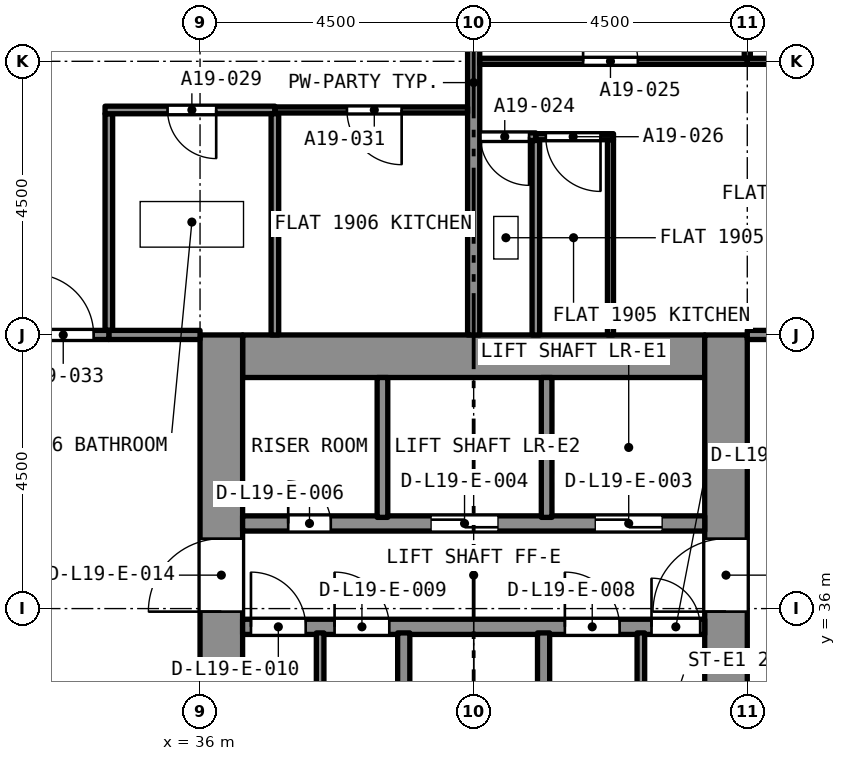
"""IFC4 building model, lengths in metres.
Left out: names, types, materials, properties, quantities, classifications, styles, units other than length and angle.
Written with IfcOpenShell. Run it as: python <this file> out.ifc"""

import sys

from ifc_helpers import new_model, si_unit, direction, frame, frame_2d, origin, place, context, subcontext, project, spatial, rectangle, extrude, element, fill, save


model = new_model("IFC4")
c1 = context("Model", 3, precision=1e-05, world=origin(), true_north=direction((0.0, 1.0)))
c2 = subcontext(c1, "Body", "Model", "MODEL_VIEW")
j1 = project(units=[si_unit("LENGTHUNIT", "METRE"), si_unit("PLANEANGLEUNIT", "RADIAN")], contexts=[c1])
p1 = place(None, origin())
s1 = spatial("IfcSite", under=j1, at=p1, CompositionType="ELEMENT")
p2 = place(p1, origin())
s2 = spatial("IfcBuilding", under=s1, at=p2, CompositionType="ELEMENT")
p3 = place(p2, frame((0.0, 0.0, 72.0)))
s3 = spatial("IfcBuildingStorey", under=s2, at=p3, CompositionType="ELEMENT", Elevation=72.0)
p4 = place(p3, frame((36.7, 40.15, 0.0), z_axis=(0.0, 0.0, 1.0), x_axis=(1.0, 0.0, 0.0)))
e1 = element("IfcWall", 1, at=p4, inside=s3, PredefinedType="SOLIDWALL", context=c2, shape_type="SweptSolid", body=[
    extrude(rectangle(XDim=7.6, YDim=0.7, at=frame_2d((3.8, 0.0))), origin(), (0.0, 0.0, 1.0), 3.2),
])
p5 = place(p3, frame((36.35, 27.0, 0.0), z_axis=(0.0, 0.0, 1.0), x_axis=(0.0, 1.0, 0.0)))
e2 = element("IfcWall", 2, at=p5, inside=s3, PredefinedType="SOLIDWALL", context=c2, shape_type="SweptSolid", body=[
    extrude(rectangle(XDim=13.5, YDim=0.7, at=frame_2d((6.75, 0.0))), origin(), (0.0, 0.0, 1.0), 3.2),
])
p6 = place(p5, frame((8.95, 0.0, 0.0)))
e3 = element("IfcOpeningElement", 3, at=p6, cuts=e2, PredefinedType="OPENING", context=c2, shape_type="SweptSolid", body=[
    extrude(rectangle(XDim=1.2, YDim=2.1, at=frame_2d((0.6, 1.05))), frame((0.0, 0.36, 0.0), z_axis=(0.0, -1.0, 0.0), x_axis=(1.0, 0.0, 0.0)), (0.0, 0.0, 1.0), 0.72),
])
p7 = place(p3, frame((44.65, 27.0, 0.0), z_axis=(0.0, 0.0, 1.0), x_axis=(0.0, 1.0, 0.0)))
e4 = element("IfcWall", 4, at=p7, inside=s3, PredefinedType="SOLIDWALL", context=c2, shape_type="SweptSolid", body=[
    extrude(rectangle(XDim=13.5, YDim=0.7, at=frame_2d((6.75, 0.0))), origin(), (0.0, 0.0, 1.0), 3.2),
])
p8 = place(p7, frame((8.95, 0.0, 0.0)))
e5 = element("IfcOpeningElement", 5, at=p8, cuts=e4, PredefinedType="OPENING", context=c2, shape_type="SweptSolid", body=[
    extrude(rectangle(XDim=1.2, YDim=2.1, at=frame_2d((0.6, 1.05))), frame((0.0, 0.36, 0.0), z_axis=(0.0, -1.0, 0.0), x_axis=(1.0, 0.0, 0.0)), (0.0, 0.0, 1.0), 0.72),
])
p9 = place(p3, frame((41.523, 43.76, 0.0), z_axis=(0.0, 0.0, 1.0), x_axis=(-1.0, 0.0, 0.0)))
e6 = element("IfcWall", 6, at=p9, inside=s3, PredefinedType="PARTITIONING", context=c2, shape_type="SweptSolid", body=[
    extrude(rectangle(XDim=0.923, YDim=0.125, at=frame_2d((0.461, 0.0))), origin(), (0.0, 0.0, 1.0), 2.7),
])
p10 = place(p9, frame((0.111, 0.0, 0.0)))
e7 = element("IfcOpeningElement", 7, at=p10, cuts=e6, PredefinedType="OPENING", context=c2, shape_type="SweptSolid", body=[
    extrude(rectangle(XDim=0.8, YDim=2.1, at=frame_2d((0.4, 1.05))), frame((0.0, 0.073, 0.0), z_axis=(0.0, -1.0, 0.0), x_axis=(1.0, 0.0, 0.0)), (0.0, 0.0, 1.0), 0.145),
])
p11 = place(p3, frame((41.523, 40.5, 0.0), z_axis=(0.0, 0.0, 1.0), x_axis=(0.0, 1.0, 0.0)))
e8 = element("IfcWall", 8, at=p11, inside=s3, PredefinedType="PARTITIONING", context=c2, shape_type="SweptSolid", body=[
    extrude(rectangle(XDim=3.198, YDim=0.125, at=frame_2d((1.599, 0.0))), origin(), (0.0, 0.0, 1.0), 2.7),
])
p12 = place(p3, frame((40.5, 40.5, 0.0), z_axis=(0.0, 0.0, 1.0), x_axis=(0.0, 1.0, 0.0)))
e9 = element("IfcWall", 9, at=p12, inside=s3, PredefinedType="PARTITIONING", context=c2, shape_type="SweptSolid", body=[
    extrude(rectangle(XDim=8.3, YDim=0.2, at=frame_2d((4.15, 0.0))), origin(), (0.0, 0.0, 1.0), 2.7),
])
p13 = place(p3, frame((40.6, 45.0, 0.0), z_axis=(0.0, 0.0, 1.0), x_axis=(1.0, 0.0, 0.0)))
e10 = element("IfcWall", 10, at=p13, inside=s3, PredefinedType="PARTITIONING", context=c2, shape_type="SweptSolid", body=[
    extrude(rectangle(XDim=4.4, YDim=0.1, at=frame_2d((2.2, 0.0))), origin(), (0.0, 0.0, 1.0), 2.7),
])
p14 = place(p13, frame((1.7, 0.0, 0.0)))
e11 = element("IfcOpeningElement", 11, at=p14, cuts=e10, PredefinedType="OPENING", context=c2, shape_type="SweptSolid", body=[
    extrude(rectangle(XDim=0.9, YDim=2.1, at=frame_2d((0.45, 1.05))), frame((0.0, 0.06, 0.0), z_axis=(0.0, -1.0, 0.0), x_axis=(1.0, 0.0, 0.0)), (0.0, 0.0, 1.0), 0.12),
])
p15 = place(p3, frame((45.0, 45.05, 0.0), z_axis=(0.0, 0.0, 1.0), x_axis=(0.0, 1.0, 0.0)))
e12 = element("IfcWall", 12, at=p15, inside=s3, PredefinedType="PARTITIONING", context=c2, shape_type="SweptSolid", body=[
    extrude(rectangle(XDim=3.692, YDim=0.1, at=frame_2d((1.846, 0.0))), origin(), (0.0, 0.0, 1.0), 2.7),
])
p16 = place(p3, frame((42.75, 40.5, 0.0), z_axis=(0.0, 0.0, 1.0), x_axis=(0.0, 1.0, 0.0)))
e13 = element("IfcWall", 13, at=p16, inside=s3, PredefinedType="PARTITIONING", context=c2, shape_type="SweptSolid", body=[
    extrude(rectangle(XDim=3.21, YDim=0.1, at=frame_2d((1.605, 0.0))), origin(), (0.0, 0.0, 1.0), 2.7),
])
p17 = place(p3, frame((42.8, 43.76, 0.0), z_axis=(0.0, 0.0, 1.0), x_axis=(-1.0, 0.0, 0.0)))
e14 = element("IfcWall", 14, at=p17, inside=s3, PredefinedType="PARTITIONING", context=c2, shape_type="SweptSolid", body=[
    extrude(rectangle(XDim=1.277, YDim=0.1, at=frame_2d((0.639, 0.0))), origin(), (0.0, 0.0, 1.0), 2.7),
])
p18 = place(p17, frame((0.214, 0.0, 0.0)))
e15 = element("IfcOpeningElement", 15, at=p18, cuts=e14, PredefinedType="OPENING", context=c2, shape_type="SweptSolid", body=[
    extrude(rectangle(XDim=0.9, YDim=2.1, at=frame_2d((0.45, 1.05))), frame((0.0, 0.06, 0.0), z_axis=(0.0, -1.0, 0.0), x_axis=(1.0, 0.0, 0.0)), (0.0, 0.0, 1.0), 0.12),
])
p19 = place(p3, frame((45.0, 45.0, 0.0), z_axis=(0.0, 0.0, 1.0), x_axis=(1.0, 0.0, 0.0)))
e16 = element("IfcWall", 16, at=p19, inside=s3, PredefinedType="PARTITIONING", context=c2, shape_type="SweptSolid", body=[
    extrude(rectangle(XDim=3.742, YDim=0.1, at=frame_2d((1.871, 0.0))), origin(), (0.0, 0.0, 1.0), 2.7),
])
p20 = place(p19, frame((1.4, 0.0, 0.0)))
e17 = element("IfcOpeningElement", 17, at=p20, cuts=e16, PredefinedType="OPENING", context=c2, shape_type="SweptSolid", body=[
    extrude(rectangle(XDim=1.0, YDim=2.1, at=frame_2d((0.5, 1.05))), frame((0.0, 0.06, 0.0), z_axis=(0.0, -1.0, 0.0), x_axis=(1.0, 0.0, 0.0)), (0.0, 0.0, 1.0), 0.12),
])
p21 = place(p3, frame((45.0, 40.5, 0.0), z_axis=(0.0, 0.0, 1.0), x_axis=(1.0, 0.0, 0.0)))
e18 = element("IfcWall", 18, at=p21, inside=s3, PredefinedType="PARTITIONING", context=c2, shape_type="SweptSolid", body=[
    extrude(rectangle(XDim=3.8, YDim=0.15, at=frame_2d((1.9, 0.0))), origin(), (0.0, 0.0, 1.0), 2.7),
])
p22 = place(p21, frame((1.75, 0.0, 0.0)))
e19 = element("IfcOpeningElement", 19, at=p22, cuts=e18, PredefinedType="OPENING", context=c2, shape_type="SweptSolid", body=[
    extrude(rectangle(XDim=1.0, YDim=2.1, at=frame_2d((0.5, 1.05))), frame((0.0, 0.085, 0.0), z_axis=(0.0, -1.0, 0.0), x_axis=(1.0, 0.0, 0.0)), (0.0, 0.0, 1.0), 0.17),
])
p23 = place(p3, frame((34.5, 40.575, 0.0), z_axis=(0.0, 0.0, 1.0), x_axis=(0.0, 1.0, 0.0)))
e20 = element("IfcWall", 20, at=p23, inside=s3, PredefinedType="PARTITIONING", context=c2, shape_type="SweptSolid", body=[
    extrude(rectangle(XDim=3.562, YDim=0.125, at=frame_2d((1.781, 0.0))), origin(), (0.0, 0.0, 1.0), 2.7),
])
p24 = place(p3, frame((37.231, 44.2, 0.0), z_axis=(0.0, 0.0, 1.0), x_axis=(-1.0, 0.0, 0.0)))
e21 = element("IfcWall", 21, at=p24, inside=s3, PredefinedType="PARTITIONING", context=c2, shape_type="SweptSolid", body=[
    extrude(rectangle(XDim=2.794, YDim=0.125, at=frame_2d((1.397, 0.0))), origin(), (0.0, 0.0, 1.0), 2.7),
])
p25 = place(p24, frame((0.966, 0.0, 0.0)))
e22 = element("IfcOpeningElement", 22, at=p25, cuts=e21, PredefinedType="OPENING", context=c2, shape_type="SweptSolid", body=[
    extrude(rectangle(XDim=0.8, YDim=2.1, at=frame_2d((0.4, 1.05))), frame((0.0, 0.073, 0.0), z_axis=(0.0, -1.0, 0.0), x_axis=(1.0, 0.0, 0.0)), (0.0, 0.0, 1.0), 0.145),
])
p26 = place(p3, frame((37.231, 40.5, 0.0), z_axis=(0.0, 0.0, 1.0), x_axis=(0.0, 1.0, 0.0)))
e23 = element("IfcWall", 23, at=p26, inside=s3, PredefinedType="PARTITIONING", context=c2, shape_type="SweptSolid", body=[
    extrude(rectangle(XDim=3.637, YDim=0.125, at=frame_2d((1.819, 0.0))), origin(), (0.0, 0.0, 1.0), 2.7),
])
p27 = place(p3, frame((34.5, 40.5, 0.0), z_axis=(0.0, 0.0, 1.0), x_axis=(1.0, 0.0, 0.0)))
e24 = element("IfcWall", 24, at=p27, inside=s3, PredefinedType="PARTITIONING", context=c2, shape_type="SweptSolid", body=[
    extrude(rectangle(XDim=1.5, YDim=0.15, at=frame_2d((0.75, 0.0))), origin(), (0.0, 0.0, 1.0), 2.7),
])
p28 = place(p3, frame((40.4, 44.2, 0.0), z_axis=(0.0, 0.0, 1.0), x_axis=(-1.0, 0.0, 0.0)))
e25 = element("IfcWall", 25, at=p28, inside=s3, PredefinedType="PARTITIONING", context=c2, shape_type="SweptSolid", body=[
    extrude(rectangle(XDim=3.168, YDim=0.1, at=frame_2d((1.584, 0.0))), origin(), (0.0, 0.0, 1.0), 2.7),
])
p29 = place(p28, frame((1.084, 0.0, 0.0)))
e26 = element("IfcOpeningElement", 26, at=p29, cuts=e25, PredefinedType="OPENING", context=c2, shape_type="SweptSolid", body=[
    extrude(rectangle(XDim=0.9, YDim=2.1, at=frame_2d((0.45, 1.05))), frame((0.0, 0.06, 0.0), z_axis=(0.0, -1.0, 0.0), x_axis=(1.0, 0.0, 0.0)), (0.0, 0.0, 1.0), 0.12),
])
p30 = place(p3, frame((32.2, 40.5, 0.0), z_axis=(0.0, 0.0, 1.0), x_axis=(1.0, 0.0, 0.0)))
e27 = element("IfcWall", 27, at=p30, inside=s3, PredefinedType="PARTITIONING", context=c2, shape_type="SweptSolid", body=[
    extrude(rectangle(XDim=2.3, YDim=0.15, at=frame_2d((1.15, 0.0))), origin(), (0.0, 0.0, 1.0), 2.7),
])
p31 = place(p30, frame((1.05, 0.0, 0.0)))
e28 = element("IfcOpeningElement", 28, at=p31, cuts=e27, PredefinedType="OPENING", context=c2, shape_type="SweptSolid", body=[
    extrude(rectangle(XDim=1.0, YDim=2.1, at=frame_2d((0.5, 1.05))), frame((0.0, 0.085, 0.0), z_axis=(0.0, -1.0, 0.0), x_axis=(1.0, 0.0, 0.0)), (0.0, 0.0, 1.0), 0.17),
])
p32 = place(p3, frame((36.7, 35.7, 0.0), z_axis=(0.0, 0.0, 1.0), x_axis=(1.0, 0.0, 0.0)))
e29 = element("IfcWall", 29, at=p32, inside=s3, PredefinedType="SOLIDWALL", context=c2, shape_type="SweptSolid", body=[
    extrude(rectangle(XDim=7.6, YDim=0.25, at=frame_2d((3.8, 0.0))), origin(), (0.0, 0.0, 1.0), 2.7),
])
p33 = place(p32, frame((6.725, 0.0, 0.0)))
e30 = element("IfcOpeningElement", 30, at=p33, cuts=e29, PredefinedType="OPENING", context=c2, shape_type="SweptSolid", body=[
    extrude(rectangle(XDim=0.8, YDim=2.1, at=frame_2d((0.4, 1.05))), frame((0.0, 0.135, 0.0), z_axis=(0.0, -1.0, 0.0), x_axis=(1.0, 0.0, 0.0)), (0.0, 0.0, 1.0), 0.27),
])
p34 = place(p32, frame((5.3, 0.0, 0.0)))
e31 = element("IfcOpeningElement", 31, at=p34, cuts=e29, PredefinedType="OPENING", context=c2, shape_type="SweptSolid", body=[
    extrude(rectangle(XDim=0.9, YDim=2.1, at=frame_2d((0.45, 1.05))), frame((0.0, 0.135, 0.0), z_axis=(0.0, -1.0, 0.0), x_axis=(1.0, 0.0, 0.0)), (0.0, 0.0, 1.0), 0.27),
])
p35 = place(p32, frame((1.512, 0.0, 0.0)))
e32 = element("IfcOpeningElement", 32, at=p35, cuts=e29, PredefinedType="OPENING", context=c2, shape_type="SweptSolid", body=[
    extrude(rectangle(XDim=0.9, YDim=2.1, at=frame_2d((0.45, 1.05))), frame((0.0, 0.135, 0.0), z_axis=(0.0, -1.0, 0.0), x_axis=(1.0, 0.0, 0.0)), (0.0, 0.0, 1.0), 0.27),
])
p36 = place(p32, frame((0.137, 0.0, 0.0)))
e33 = element("IfcOpeningElement", 33, at=p36, cuts=e29, PredefinedType="OPENING", context=c2, shape_type="SweptSolid", body=[
    extrude(rectangle(XDim=0.9, YDim=2.1, at=frame_2d((0.45, 1.05))), frame((0.0, 0.135, 0.0), z_axis=(0.0, -1.0, 0.0), x_axis=(1.0, 0.0, 0.0)), (0.0, 0.0, 1.0), 0.27),
])
p37 = place(p3, frame((36.7, 37.4, 0.0), z_axis=(0.0, 0.0, 1.0), x_axis=(1.0, 0.0, 0.0)))
e34 = element("IfcWall", 34, at=p37, inside=s3, PredefinedType="SOLIDWALL", context=c2, shape_type="SweptSolid", body=[
    extrude(rectangle(XDim=7.6, YDim=0.25, at=frame_2d((3.8, 0.0))), origin(), (0.0, 0.0, 1.0), 2.7),
])
p38 = place(p37, frame((5.8, 0.0, 0.0)))
e35 = element("IfcOpeningElement", 35, at=p38, cuts=e34, PredefinedType="OPENING", context=c2, shape_type="SweptSolid", body=[
    extrude(rectangle(XDim=1.1, YDim=2.4, at=frame_2d((0.55, 1.2))), frame((0.0, 0.135, 0.0), z_axis=(0.0, -1.0, 0.0), x_axis=(1.0, 0.0, 0.0)), (0.0, 0.0, 1.0), 0.27),
])
p39 = place(p37, frame((3.1, 0.0, 0.0)))
e36 = element("IfcOpeningElement", 36, at=p39, cuts=e34, PredefinedType="OPENING", context=c2, shape_type="SweptSolid", body=[
    extrude(rectangle(XDim=1.1, YDim=2.4, at=frame_2d((0.55, 1.2))), frame((0.0, 0.135, 0.0), z_axis=(0.0, -1.0, 0.0), x_axis=(1.0, 0.0, 0.0)), (0.0, 0.0, 1.0), 0.27),
])
p40 = place(p37, frame((0.75, 0.0, 0.0)))
e37 = element("IfcOpeningElement", 37, at=p40, cuts=e34, PredefinedType="OPENING", context=c2, shape_type="SweptSolid", body=[
    extrude(rectangle(XDim=0.7, YDim=2.1, at=frame_2d((0.35, 1.05))), frame((0.0, 0.135, 0.0), z_axis=(0.0, -1.0, 0.0), x_axis=(1.0, 0.0, 0.0)), (0.0, 0.0, 1.0), 0.27),
])
for number, where, z_axis, x_axis in (
    (38, (41.65, 33.3, 0.0), (0.0, 0.0, 1.0), (0.0, 1.0, 0.0)),
    (39, (39.35, 33.3, 0.0), (0.0, 0.0, 1.0), (0.0, 1.0, 0.0)),
):
    element("IfcWall", number, at=place(p3, frame(where, z_axis=z_axis, x_axis=x_axis)), inside=s3, PredefinedType="SOLIDWALL", context=c2, shape_type="SweptSolid", body=[
        extrude(rectangle(XDim=2.3, YDim=0.2, at=frame_2d((1.15, 0.0))), origin(), (0.0, 0.0, 1.0), 2.7),
    ])
for number, where, z_axis, x_axis in (
    (40, (41.7, 37.5, 0.0), (0.0, 0.0, 1.0), (0.0, 1.0, 0.0)),
    (41, (39.0, 37.5, 0.0), (0.0, 0.0, 1.0), (0.0, 1.0, 0.0)),
):
    element("IfcWall", number, at=place(p3, frame(where, z_axis=z_axis, x_axis=x_axis)), inside=s3, PredefinedType="SOLIDWALL", context=c2, shape_type="SweptSolid", body=[
        extrude(rectangle(XDim=2.3, YDim=0.175, at=frame_2d((1.15, 0.0))), origin(), (0.0, 0.0, 1.0), 2.7),
    ])
for number, where, z_axis, x_axis in (
    (42, (43.25, 33.3, 0.0), (0.0, 0.0, 1.0), (0.0, 1.0, 0.0)),
    (43, (37.975, 33.3, 0.0), (0.0, 0.0, 1.0), (0.0, 1.0, 0.0)),
):
    element("IfcWall", number, at=place(p3, frame(where, z_axis=z_axis, x_axis=x_axis)), inside=s3, PredefinedType="PARTITIONING", context=c2, shape_type="SweptSolid", body=[
        extrude(rectangle(XDim=2.3, YDim=0.125, at=frame_2d((1.15, 0.0))), origin(), (0.0, 0.0, 1.0), 2.7),
    ])
p41 = place(p10, origin())
e44 = element("IfcDoor", 44, at=p41, inside=s3, OperationType="SINGLE_SWING_RIGHT", PredefinedType="DOOR", context=c2, shape_type="SweptSolid", body=[
    extrude(rectangle(XDim=0.8, YDim=2.1, at=frame_2d((0.4, 1.05))), frame((0.0, 0.025, 0.0), z_axis=(0.0, -1.0, 0.0), x_axis=(1.0, 0.0, 0.0)), (0.0, 0.0, 1.0), 0.05),
])
fill(e7, e44)
p42 = place(p14, origin())
e45 = element("IfcDoor", 45, at=p42, inside=s3, OperationType="SINGLE_SWING_LEFT", PredefinedType="DOOR", context=c2, shape_type="SweptSolid", body=[
    extrude(rectangle(XDim=0.9, YDim=2.1, at=frame_2d((0.45, 1.05))), frame((0.0, 0.025, 0.0), z_axis=(0.0, -1.0, 0.0), x_axis=(1.0, 0.0, 0.0)), (0.0, 0.0, 1.0), 0.05),
])
fill(e11, e45)
p43 = place(p18, origin())
e46 = element("IfcDoor", 46, at=p43, inside=s3, OperationType="SINGLE_SWING_RIGHT", PredefinedType="DOOR", context=c2, shape_type="SweptSolid", body=[
    extrude(rectangle(XDim=0.9, YDim=2.1, at=frame_2d((0.45, 1.05))), frame((0.0, 0.025, 0.0), z_axis=(0.0, -1.0, 0.0), x_axis=(1.0, 0.0, 0.0)), (0.0, 0.0, 1.0), 0.05),
])
fill(e15, e46)
p44 = place(p25, origin())
e47 = element("IfcDoor", 47, at=p44, inside=s3, OperationType="SINGLE_SWING_LEFT", PredefinedType="DOOR", context=c2, shape_type="SweptSolid", body=[
    extrude(rectangle(XDim=0.8, YDim=2.1, at=frame_2d((0.4, 1.05))), frame((0.0, 0.025, 0.0), z_axis=(0.0, -1.0, 0.0), x_axis=(1.0, 0.0, 0.0)), (0.0, 0.0, 1.0), 0.05),
])
fill(e22, e47)
p45 = place(p29, origin())
e48 = element("IfcDoor", 48, at=p45, inside=s3, OperationType="SINGLE_SWING_LEFT", PredefinedType="DOOR", context=c2, shape_type="SweptSolid", body=[
    extrude(rectangle(XDim=0.9, YDim=2.1, at=frame_2d((0.45, 1.05))), frame((0.0, 0.025, 0.0), z_axis=(0.0, -1.0, 0.0), x_axis=(1.0, 0.0, 0.0)), (0.0, 0.0, 1.0), 0.05),
])
fill(e26, e48)
p46 = place(p31, origin())
e49 = element("IfcDoor", 49, at=p46, inside=s3, OperationType="SINGLE_SWING_RIGHT", PredefinedType="DOOR", context=c2, shape_type="SweptSolid", body=[
    extrude(rectangle(XDim=1.0, YDim=2.1, at=frame_2d((0.5, 1.05))), frame((0.0, 0.025, 0.0), z_axis=(0.0, -1.0, 0.0), x_axis=(1.0, 0.0, 0.0)), (0.0, 0.0, 1.0), 0.05),
])
fill(e28, e49)
p47 = place(p38, origin())
e50 = element("IfcDoor", 50, at=p47, inside=s3, OperationType="SLIDING_TO_LEFT", PredefinedType="DOOR", context=c2, shape_type="SweptSolid", body=[
    extrude(rectangle(XDim=1.1, YDim=2.4, at=frame_2d((0.55, 1.2))), frame((0.0, 0.025, 0.0), z_axis=(0.0, -1.0, 0.0), x_axis=(1.0, 0.0, 0.0)), (0.0, 0.0, 1.0), 0.05),
])
fill(e35, e50)
p48 = place(p39, origin())
e51 = element("IfcDoor", 51, at=p48, inside=s3, OperationType="SLIDING_TO_LEFT", PredefinedType="DOOR", context=c2, shape_type="SweptSolid", body=[
    extrude(rectangle(XDim=1.1, YDim=2.4, at=frame_2d((0.55, 1.2))), frame((0.0, 0.025, 0.0), z_axis=(0.0, -1.0, 0.0), x_axis=(1.0, 0.0, 0.0)), (0.0, 0.0, 1.0), 0.05),
])
fill(e36, e51)
p49 = place(p40, origin())
e52 = element("IfcDoor", 52, at=p49, inside=s3, OperationType="SINGLE_SWING_LEFT", PredefinedType="DOOR", context=c2, shape_type="SweptSolid", body=[
    extrude(rectangle(XDim=0.7, YDim=2.1, at=frame_2d((0.35, 1.05))), frame((0.0, 0.025, 0.0), z_axis=(0.0, -1.0, 0.0), x_axis=(1.0, 0.0, 0.0)), (0.0, 0.0, 1.0), 0.05),
])
fill(e37, e52)
p50 = place(p33, origin())
e53 = element("IfcDoor", 53, at=p50, inside=s3, OperationType="SINGLE_SWING_LEFT", PredefinedType="DOOR", context=c2, shape_type="SweptSolid", body=[
    extrude(rectangle(XDim=0.8, YDim=2.1, at=frame_2d((0.4, 1.05))), frame((0.0, 0.025, 0.0), z_axis=(0.0, -1.0, 0.0), x_axis=(1.0, 0.0, 0.0)), (0.0, 0.0, 1.0), 0.05),
])
fill(e30, e53)
p51 = place(p34, origin())
e54 = element("IfcDoor", 54, at=p51, inside=s3, OperationType="SINGLE_SWING_LEFT", PredefinedType="DOOR", context=c2, shape_type="SweptSolid", body=[
    extrude(rectangle(XDim=0.9, YDim=2.1, at=frame_2d((0.45, 1.05))), frame((0.0, 0.025, 0.0), z_axis=(0.0, -1.0, 0.0), x_axis=(1.0, 0.0, 0.0)), (0.0, 0.0, 1.0), 0.05),
])
fill(e31, e54)
p52 = place(p35, origin())
e55 = element("IfcDoor", 55, at=p52, inside=s3, OperationType="SINGLE_SWING_LEFT", PredefinedType="DOOR", context=c2, shape_type="SweptSolid", body=[
    extrude(rectangle(XDim=0.9, YDim=2.1, at=frame_2d((0.45, 1.05))), frame((0.0, 0.025, 0.0), z_axis=(0.0, -1.0, 0.0), x_axis=(1.0, 0.0, 0.0)), (0.0, 0.0, 1.0), 0.05),
])
fill(e32, e55)
p53 = place(p36, origin())
e56 = element("IfcDoor", 56, at=p53, inside=s3, OperationType="SINGLE_SWING_LEFT", PredefinedType="DOOR", context=c2, shape_type="SweptSolid", body=[
    extrude(rectangle(XDim=0.9, YDim=2.1, at=frame_2d((0.45, 1.05))), frame((0.0, 0.025, 0.0), z_axis=(0.0, -1.0, 0.0), x_axis=(1.0, 0.0, 0.0)), (0.0, 0.0, 1.0), 0.05),
])
fill(e33, e56)
p54 = place(p6, origin())
e57 = element("IfcDoor", 57, at=p54, inside=s3, OperationType="SINGLE_SWING_LEFT", PredefinedType="DOOR", context=c2, shape_type="SweptSolid", body=[
    extrude(rectangle(XDim=1.2, YDim=2.1, at=frame_2d((0.6, 1.05))), frame((0.0, 0.025, 0.0), z_axis=(0.0, -1.0, 0.0), x_axis=(1.0, 0.0, 0.0)), (0.0, 0.0, 1.0), 0.05),
])
fill(e3, e57)
p55 = place(p8, origin())
e58 = element("IfcDoor", 58, at=p55, inside=s3, OperationType="SINGLE_SWING_LEFT", PredefinedType="DOOR", context=c2, shape_type="SweptSolid", body=[
    extrude(rectangle(XDim=1.2, YDim=2.1, at=frame_2d((0.6, 1.05))), frame((0.0, 0.025, 0.0), z_axis=(0.0, -1.0, 0.0), x_axis=(1.0, 0.0, 0.0)), (0.0, 0.0, 1.0), 0.05),
])
fill(e5, e58)
save(model, sys.argv[1])
